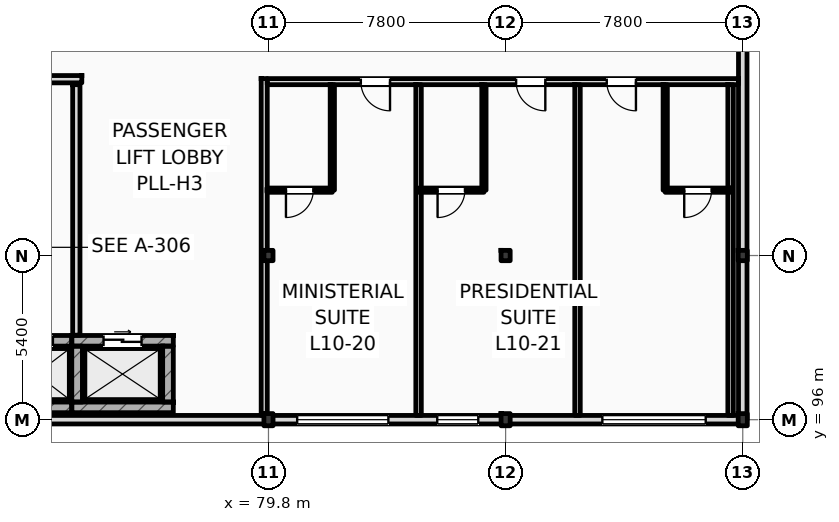
"""IFC4 building model, lengths in metres.
Left out: names, types, materials, properties, quantities, classifications, styles, units other than length and angle.
Written with IfcOpenShell. Run it as: python <this file> out.ifc"""

import sys

from ifc_helpers import new_model, si_unit, direction, frame, frame_2d, origin, origin_2d, place, context, subcontext, project, spatial, rectangle, i_section, extrude, element, fill, save


model = new_model("IFC4")
c1 = context("Model", 3, precision=1e-05, world=origin(), true_north=direction((0.0, 1.0)))
c2 = subcontext(c1, "Body", "Model", "MODEL_VIEW")
j1 = project(units=[si_unit("LENGTHUNIT", "METRE"), si_unit("PLANEANGLEUNIT", "RADIAN")], contexts=[c1])
p1 = place(None, origin())
s1 = spatial("IfcSite", under=j1, at=p1, CompositionType="ELEMENT")
p2 = place(p1, origin())
s2 = spatial("IfcBuilding", under=s1, at=p2, CompositionType="ELEMENT")
p3 = place(p2, frame((0.0, 0.0, 42.6)))
s3 = spatial("IfcBuildingStorey", under=s2, at=p3, CompositionType="ELEMENT", Elevation=42.6)
p4 = place(p3, frame((79.8, 96.0, 0.0), z_axis=(0.0, 0.0, 1.0), x_axis=(1.0, 0.0, 0.0)))
e1 = element("IfcColumn", 1, at=p4, inside=s3, PredefinedType="COLUMN", context=c2, shape_type="SweptSolid", body=[
    extrude(i_section(OverallWidth=0.3, OverallDepth=0.4, WebThickness=0.013, FlangeThickness=0.024, FilletRadius=0.027, at=origin_2d()), origin(), (0.0, 0.0, 1.0), 4.2),
])
p5 = place(p3, frame((79.8, 101.4, 0.0), z_axis=(0.0, 0.0, 1.0), x_axis=(1.0, 0.0, 0.0)))
e2 = element("IfcColumn", 2, at=p5, inside=s3, PredefinedType="COLUMN", context=c2, shape_type="SweptSolid", body=[
    extrude(i_section(OverallWidth=0.3, OverallDepth=0.34, WebThickness=0.012, FlangeThickness=0.021, FilletRadius=0.027, at=origin_2d()), origin(), (0.0, 0.0, 1.0), 4.2),
])
p6 = place(p3, frame((87.6, 96.0, 0.0), z_axis=(0.0, 0.0, 1.0), x_axis=(1.0, 0.0, 0.0)))
e3 = element("IfcColumn", 3, at=p6, inside=s3, PredefinedType="COLUMN", context=c2, shape_type="SweptSolid", body=[
    extrude(i_section(OverallWidth=0.3, OverallDepth=0.4, WebThickness=0.013, FlangeThickness=0.024, FilletRadius=0.027, at=origin_2d()), origin(), (0.0, 0.0, 1.0), 4.2),
])
p7 = place(p3, frame((87.6, 101.4, 0.0), z_axis=(0.0, 0.0, 1.0), x_axis=(1.0, 0.0, 0.0)))
e4 = element("IfcColumn", 4, at=p7, inside=s3, PredefinedType="COLUMN", context=c2, shape_type="SweptSolid", body=[
    extrude(i_section(OverallWidth=0.3, OverallDepth=0.34, WebThickness=0.012, FlangeThickness=0.021, FilletRadius=0.027, at=origin_2d()), origin(), (0.0, 0.0, 1.0), 4.2),
])
p8 = place(p3, frame((95.4, 96.0, 0.0), z_axis=(0.0, 0.0, 1.0), x_axis=(1.0, 0.0, 0.0)))
e5 = element("IfcColumn", 5, at=p8, inside=s3, PredefinedType="COLUMN", context=c2, shape_type="SweptSolid", body=[
    extrude(i_section(OverallWidth=0.3, OverallDepth=0.4, WebThickness=0.013, FlangeThickness=0.024, FilletRadius=0.027, at=origin_2d()), origin(), (0.0, 0.0, 1.0), 4.2),
])
p9 = place(p3, frame((95.4, 101.4, 0.0), z_axis=(0.0, 0.0, 1.0), x_axis=(1.0, 0.0, 0.0)))
e6 = element("IfcColumn", 6, at=p9, inside=s3, PredefinedType="COLUMN", context=c2, shape_type="SweptSolid", body=[
    extrude(i_section(OverallWidth=0.3, OverallDepth=0.34, WebThickness=0.012, FlangeThickness=0.021, FilletRadius=0.027, at=origin_2d()), origin(), (0.0, 0.0, 1.0), 4.2),
])
p10 = place(p3, frame((95.4, 96.0, 0.0), z_axis=(0.0, 0.0, 1.0), x_axis=(0.0, 1.0, 0.0)))
e7 = element("IfcWall", 7, at=p10, inside=s3, PredefinedType="STANDARD", context=c2, shape_type="SweptSolid", body=[
    extrude(rectangle(XDim=22.0, YDim=0.28, at=frame_2d((11.0, 0.0))), origin(), (0.0, 0.0, 1.0), 3.51),
])
p11 = place(p3, frame((25.2, 96.0, 0.0), z_axis=(0.0, 0.0, 1.0), x_axis=(1.0, 0.0, 0.0)))
e8 = element("IfcWall", 8, at=p11, inside=s3, PredefinedType="STANDARD", context=c2, shape_type="SweptSolid", body=[
    extrude(rectangle(XDim=70.2, YDim=0.28, at=frame_2d((35.1, 0.0))), origin(), (0.0, 0.0, 1.0), 3.42),
])
p12 = place(p11, frame((16.83, 0.0, 0.9)))
e9 = element("IfcOpeningElement", 9, at=p12, cuts=e8, PredefinedType="OPENING", context=c2, shape_type="SweptSolid", body=[
    extrude(rectangle(XDim=2.25, YDim=2.15, at=frame_2d((1.125, 1.075))), frame((0.0, 0.15, 0.0), z_axis=(0.0, -1.0, 0.0), x_axis=(1.0, 0.0, 0.0)), (0.0, 0.0, 1.0), 0.3),
])
p13 = place(p11, frame((20.815, 0.0, 0.9)))
e10 = element("IfcOpeningElement", 10, at=p13, cuts=e8, PredefinedType="OPENING", context=c2, shape_type="SweptSolid", body=[
    extrude(rectangle(XDim=1.8, YDim=2.2, at=frame_2d((0.9, 1.1))), frame((0.0, 0.15, 0.0), z_axis=(0.0, -1.0, 0.0), x_axis=(1.0, 0.0, 0.0)), (0.0, 0.0, 1.0), 0.3),
])
p14 = place(p11, frame((26.03, 0.0, 0.9)))
e11 = element("IfcOpeningElement", 11, at=p14, cuts=e8, PredefinedType="OPENING", context=c2, shape_type="SweptSolid", body=[
    extrude(rectangle(XDim=2.55, YDim=2.25, at=frame_2d((1.275, 1.125))), frame((0.0, 0.15, 0.0), z_axis=(0.0, -1.0, 0.0), x_axis=(1.0, 0.0, 0.0)), (0.0, 0.0, 1.0), 0.3),
])
p15 = place(p11, frame((32.045, 0.0, 0.9)))
e12 = element("IfcOpeningElement", 12, at=p15, cuts=e8, PredefinedType="OPENING", context=c2, shape_type="SweptSolid", body=[
    extrude(rectangle(XDim=1.35, YDim=2.3, at=frame_2d((0.675, 1.15))), frame((0.0, 0.15, 0.0), z_axis=(0.0, -1.0, 0.0), x_axis=(1.0, 0.0, 0.0)), (0.0, 0.0, 1.0), 0.3),
])
p16 = place(p11, frame((35.2, 0.0, 0.9)))
e13 = element("IfcOpeningElement", 13, at=p16, cuts=e8, PredefinedType="OPENING", context=c2, shape_type="SweptSolid", body=[
    extrude(rectangle(XDim=2.85, YDim=2.34, at=frame_2d((1.425, 1.17))), frame((0.0, 0.15, 0.0), z_axis=(0.0, -1.0, 0.0), x_axis=(1.0, 0.0, 0.0)), (0.0, 0.0, 1.0), 0.3),
])
p17 = place(p11, frame((55.544, 0.0, 0.9)))
e14 = element("IfcOpeningElement", 14, at=p17, cuts=e8, PredefinedType="OPENING", context=c2, shape_type="SweptSolid", body=[
    extrude(rectangle(XDim=3.0, YDim=2.34, at=frame_2d((1.5, 1.17))), frame((0.0, 0.15, 0.0), z_axis=(0.0, -1.0, 0.0), x_axis=(1.0, 0.0, 0.0)), (0.0, 0.0, 1.0), 0.3),
])
p18 = place(p11, frame((60.151, 0.0, 0.9)))
e15 = element("IfcOpeningElement", 15, at=p18, cuts=e8, PredefinedType="OPENING", context=c2, shape_type="SweptSolid", body=[
    extrude(rectangle(XDim=1.35, YDim=2.34, at=frame_2d((0.675, 1.17))), frame((0.0, 0.15, 0.0), z_axis=(0.0, -1.0, 0.0), x_axis=(1.0, 0.0, 0.0)), (0.0, 0.0, 1.0), 0.3),
])
p19 = place(p11, frame((65.582, 0.0, 0.9)))
e16 = element("IfcOpeningElement", 16, at=p19, cuts=e8, PredefinedType="OPENING", context=c2, shape_type="SweptSolid", body=[
    extrude(rectangle(XDim=3.4, YDim=2.34, at=frame_2d((1.7, 1.17))), frame((0.0, 0.15, 0.0), z_axis=(0.0, -1.0, 0.0), x_axis=(1.0, 0.0, 0.0)), (0.0, 0.0, 1.0), 0.3),
])
p20 = place(p3, frame((70.64, 98.595, 0.0), z_axis=(0.0, 0.0, 1.0), x_axis=(1.0, 0.0, 0.0)))
e17 = element("IfcWall", 17, at=p20, inside=s3, PredefinedType="SHEAR", context=c2, shape_type="SweptSolid", body=[
    extrude(rectangle(XDim=2.69, YDim=0.35, at=frame_2d((1.345, 0.0))), origin(), (0.0, 0.0, 1.0), 3.94),
])
p21 = place(p20, frame((0.97, 0.0, 0.0)))
e18 = element("IfcOpeningElement", 18, at=p21, cuts=e17, PredefinedType="OPENING", context=c2, shape_type="SweptSolid", body=[
    extrude(rectangle(XDim=1.1, YDim=2.2, at=frame_2d((0.55, 1.1))), frame((0.0, 0.185, 0.0), z_axis=(0.0, -1.0, 0.0), x_axis=(1.0, 0.0, 0.0)), (0.0, 0.0, 1.0), 0.37),
])
p22 = place(p3, frame((70.64, 96.405, 0.0), z_axis=(0.0, 0.0, 1.0), x_axis=(1.0, 0.0, 0.0)))
e19 = element("IfcWall", 19, at=p22, inside=s3, PredefinedType="SHEAR", context=c2, shape_type="SweptSolid", body=[
    extrude(rectangle(XDim=2.69, YDim=0.35, at=frame_2d((1.345, 0.0))), origin(), (0.0, 0.0, 1.0), 3.94),
])
p23 = place(p3, frame((73.33, 98.595, 0.0), z_axis=(0.0, 0.0, 1.0), x_axis=(1.0, 0.0, 0.0)))
e20 = element("IfcWall", 20, at=p23, inside=s3, PredefinedType="SHEAR", context=c2, shape_type="SweptSolid", body=[
    extrude(rectangle(XDim=3.34, YDim=0.35, at=frame_2d((1.67, 0.0))), origin(), (0.0, 0.0, 1.0), 3.94),
])
p24 = place(p23, frame((1.045, 0.0, 0.0)))
e21 = element("IfcOpeningElement", 21, at=p24, cuts=e20, PredefinedType="OPENING", context=c2, shape_type="SweptSolid", body=[
    extrude(rectangle(XDim=1.25, YDim=2.25, at=frame_2d((0.625, 1.125))), frame((0.0, 0.185, 0.0), z_axis=(0.0, -1.0, 0.0), x_axis=(1.0, 0.0, 0.0)), (0.0, 0.0, 1.0), 0.37),
])
p25 = place(p3, frame((73.33, 96.405, 0.0), z_axis=(0.0, 0.0, 1.0), x_axis=(1.0, 0.0, 0.0)))
e22 = element("IfcWall", 22, at=p25, inside=s3, PredefinedType="SHEAR", context=c2, shape_type="SweptSolid", body=[
    extrude(rectangle(XDim=3.34, YDim=0.35, at=frame_2d((1.67, 0.0))), origin(), (0.0, 0.0, 1.0), 3.94),
])
for number, where, z_axis, x_axis in (
    (23, (73.505, 96.58, 0.0), (0.0, 0.0, 1.0), (0.0, 1.0, 0.0)),
    (24, (76.495, 96.58, 0.0), (0.0, 0.0, 1.0), (0.0, 1.0, 0.0)),
):
    element("IfcWall", number, at=place(p3, frame(where, z_axis=z_axis, x_axis=x_axis)), inside=s3, PredefinedType="SHEAR", context=c2, shape_type="SweptSolid", body=[
        extrude(rectangle(XDim=1.84, YDim=0.35, at=frame_2d((0.92, 0.0))), origin(), (0.0, 0.0, 1.0), 3.94),
    ])
p26 = place(p3, frame((73.48, 98.78, 0.0), z_axis=(0.0, 0.0, 1.0), x_axis=(0.0, 1.0, 0.0)))
e25 = element("IfcWall", 25, at=p26, inside=s3, PredefinedType="STANDARD", context=c2, shape_type="SweptSolid", body=[
    extrude(rectangle(XDim=8.24, YDim=0.24, at=frame_2d((4.12, 0.0))), origin(), (0.0, 0.0, 1.0), 3.94),
])
p27 = place(p3, frame((69.56, 107.2, 0.0), z_axis=(0.0, 0.0, 1.0), x_axis=(1.0, 0.0, 0.0)))
e26 = element("IfcWall", 26, at=p27, inside=s3, PredefinedType="STANDARD", context=c2, shape_type="SweptSolid", body=[
    extrude(rectangle(XDim=4.1, YDim=0.24, at=frame_2d((2.05, 0.0))), origin(), (0.0, 0.0, 1.0), 3.94),
])
p28 = place(p27, frame((1.3, 0.0, 0.0)))
e27 = element("IfcOpeningElement", 27, at=p28, cuts=e26, PredefinedType="OPENING", context=c2, shape_type="SweptSolid", body=[
    extrude(rectangle(XDim=1.1, YDim=2.2, at=frame_2d((0.55, 1.1))), frame((0.0, 0.13, 0.0), z_axis=(0.0, -1.0, 0.0), x_axis=(1.0, 0.0, 0.0)), (0.0, 0.0, 1.0), 0.26),
])
p29 = place(p3, frame((79.76, 107.12, 0.0), z_axis=(0.0, 0.0, 1.0), x_axis=(1.0, 0.0, 0.0)))
e28 = element("IfcWall", 28, at=p29, inside=s3, PredefinedType="PARTITIONING", context=c2, shape_type="SweptSolid", body=[
    extrude(rectangle(XDim=15.5, YDim=0.2, at=frame_2d((7.75, 0.0))), origin(), (0.0, 0.0, 1.0), 3.94),
])
p30 = place(p29, frame((3.078, 0.0, 0.0)))
e29 = element("IfcOpeningElement", 29, at=p30, cuts=e28, PredefinedType="OPENING", context=c2, shape_type="SweptSolid", body=[
    extrude(rectangle(XDim=0.96, YDim=2.2, at=frame_2d((0.48, 1.1))), frame((0.0, 0.11, 0.0), z_axis=(0.0, -1.0, 0.0), x_axis=(1.0, 0.0, 0.0)), (0.0, 0.0, 1.0), 0.22),
])
p31 = place(p29, frame((8.186, 0.0, 0.0)))
e30 = element("IfcOpeningElement", 30, at=p31, cuts=e28, PredefinedType="OPENING", context=c2, shape_type="SweptSolid", body=[
    extrude(rectangle(XDim=0.96, YDim=2.2, at=frame_2d((0.48, 1.1))), frame((0.0, 0.11, 0.0), z_axis=(0.0, -1.0, 0.0), x_axis=(1.0, 0.0, 0.0)), (0.0, 0.0, 1.0), 0.22),
])
p32 = place(p29, frame((11.167, 0.0, 0.0)))
e31 = element("IfcOpeningElement", 31, at=p32, cuts=e28, PredefinedType="OPENING", context=c2, shape_type="SweptSolid", body=[
    extrude(rectangle(XDim=0.96, YDim=2.2, at=frame_2d((0.48, 1.1))), frame((0.0, 0.11, 0.0), z_axis=(0.0, -1.0, 0.0), x_axis=(1.0, 0.0, 0.0)), (0.0, 0.0, 1.0), 0.22),
])
p33 = place(p3, frame((79.66, 96.14, 0.0), z_axis=(0.0, 0.0, 1.0), x_axis=(0.0, 1.0, 0.0)))
e32 = element("IfcWall", 32, at=p33, inside=s3, PredefinedType="PARTITIONING", context=c2, shape_type="SweptSolid", body=[
    extrude(rectangle(XDim=11.08, YDim=0.2, at=frame_2d((5.54, 0.0))), origin(), (0.0, 0.0, 1.0), 3.51),
])
p34 = place(p3, frame((84.737, 96.14, 0.0), z_axis=(0.0, 0.0, 1.0), x_axis=(0.0, 1.0, 0.0)))
e33 = element("IfcWall", 33, at=p34, inside=s3, PredefinedType="PARTITIONING", context=c2, shape_type="SweptSolid", body=[
    extrude(rectangle(XDim=10.88, YDim=0.18, at=frame_2d((5.44, 0.0))), origin(), (0.0, 0.0, 1.0), 3.94),
])
p35 = place(p3, frame((81.9, 103.55, 0.0), z_axis=(0.0, 0.0, 1.0), x_axis=(0.0, 1.0, 0.0)))
e34 = element("IfcWall", 34, at=p35, inside=s3, PredefinedType="PARTITIONING", context=c2, shape_type="SweptSolid", body=[
    extrude(rectangle(XDim=3.47, YDim=0.14, at=frame_2d((1.735, 0.0))), origin(), (0.0, 0.0, 1.0), 3.94),
])
p36 = place(p3, frame((79.75, 103.55, 0.0), z_axis=(0.0, 0.0, 1.0), x_axis=(1.0, 0.0, 0.0)))
e35 = element("IfcWall", 35, at=p36, inside=s3, PredefinedType="PARTITIONING", context=c2, shape_type="SweptSolid", body=[
    extrude(rectangle(XDim=2.15, YDim=0.14, at=frame_2d((1.075, 0.0))), origin(), (0.0, 0.0, 1.0), 3.94),
])
p37 = place(p36, frame((0.625, 0.0, 0.0)))
e36 = element("IfcOpeningElement", 36, at=p37, cuts=e35, PredefinedType="OPENING", context=c2, shape_type="SweptSolid", body=[
    extrude(rectangle(XDim=0.9, YDim=2.1, at=frame_2d((0.45, 1.05))), frame((0.0, 0.08, 0.0), z_axis=(0.0, -1.0, 0.0), x_axis=(1.0, 0.0, 0.0)), (0.0, 0.0, 1.0), 0.16),
])
p38 = place(p3, frame((89.965, 96.14, 0.0), z_axis=(0.0, 0.0, 1.0), x_axis=(0.0, 1.0, 0.0)))
e37 = element("IfcWall", 37, at=p38, inside=s3, PredefinedType="PARTITIONING", context=c2, shape_type="SweptSolid", body=[
    extrude(rectangle(XDim=10.88, YDim=0.18, at=frame_2d((5.44, 0.0))), origin(), (0.0, 0.0, 1.0), 3.57),
])
p39 = place(p3, frame((86.887, 103.55, 0.0), z_axis=(0.0, 0.0, 1.0), x_axis=(0.0, 1.0, 0.0)))
e38 = element("IfcWall", 38, at=p39, inside=s3, PredefinedType="PARTITIONING", context=c2, shape_type="SweptSolid", body=[
    extrude(rectangle(XDim=3.47, YDim=0.14, at=frame_2d((1.735, 0.0))), origin(), (0.0, 0.0, 1.0), 3.94),
])
p40 = place(p3, frame((84.737, 103.55, 0.0), z_axis=(0.0, 0.0, 1.0), x_axis=(1.0, 0.0, 0.0)))
e39 = element("IfcWall", 39, at=p40, inside=s3, PredefinedType="PARTITIONING", context=c2, shape_type="SweptSolid", body=[
    extrude(rectangle(XDim=2.15, YDim=0.14, at=frame_2d((1.075, 0.0))), origin(), (0.0, 0.0, 1.0), 3.94),
])
p41 = place(p40, frame((0.625, 0.0, 0.0)))
e40 = element("IfcOpeningElement", 40, at=p41, cuts=e39, PredefinedType="OPENING", context=c2, shape_type="SweptSolid", body=[
    extrude(rectangle(XDim=0.9, YDim=2.1, at=frame_2d((0.45, 1.05))), frame((0.0, 0.08, 0.0), z_axis=(0.0, -1.0, 0.0), x_axis=(1.0, 0.0, 0.0)), (0.0, 0.0, 1.0), 0.16),
])
p42 = place(p3, frame((95.0, 96.14, 0.0), z_axis=(0.0, 0.0, 1.0), x_axis=(0.0, 1.0, 0.0)))
e41 = element("IfcWall", 41, at=p42, inside=s3, PredefinedType="PARTITIONING", context=c2, shape_type="SweptSolid", body=[
    extrude(rectangle(XDim=10.88, YDim=0.18, at=frame_2d((5.44, 0.0))), origin(), (0.0, 0.0, 1.0), 3.94),
])
p43 = place(p3, frame((92.85, 103.55, 0.0), z_axis=(0.0, 0.0, 1.0), x_axis=(0.0, 1.0, 0.0)))
e42 = element("IfcWall", 42, at=p43, inside=s3, PredefinedType="PARTITIONING", context=c2, shape_type="SweptSolid", body=[
    extrude(rectangle(XDim=3.47, YDim=0.14, at=frame_2d((1.735, 0.0))), origin(), (0.0, 0.0, 1.0), 3.57),
])
p44 = place(p3, frame((92.85, 103.55, 0.0), z_axis=(0.0, 0.0, 1.0), x_axis=(1.0, 0.0, 0.0)))
e43 = element("IfcWall", 43, at=p44, inside=s3, PredefinedType="PARTITIONING", context=c2, shape_type="SweptSolid", body=[
    extrude(rectangle(XDim=2.15, YDim=0.14, at=frame_2d((1.075, 0.0))), origin(), (0.0, 0.0, 1.0), 3.94),
])
p45 = place(p44, frame((0.625, 0.0, 0.0)))
e44 = element("IfcOpeningElement", 44, at=p45, cuts=e43, PredefinedType="OPENING", context=c2, shape_type="SweptSolid", body=[
    extrude(rectangle(XDim=0.9, YDim=2.1, at=frame_2d((0.45, 1.05))), frame((0.0, 0.08, 0.0), z_axis=(0.0, -1.0, 0.0), x_axis=(1.0, 0.0, 0.0)), (0.0, 0.0, 1.0), 0.16),
])
p46 = place(p17, origin())
e45 = element("IfcWindow", 45, at=p46, inside=s3, PartitioningType="DOUBLE_PANEL_VERTICAL", PredefinedType="WINDOW", context=c2, shape_type="SweptSolid", body=[
    extrude(rectangle(XDim=3.0, YDim=2.34, at=frame_2d((1.5, 1.17))), frame((0.0, 0.03, 0.0), z_axis=(0.0, -1.0, 0.0), x_axis=(1.0, 0.0, 0.0)), (0.0, 0.0, 1.0), 0.06),
])
fill(e14, e45)
p47 = place(p18, origin())
e46 = element("IfcWindow", 46, at=p47, inside=s3, PartitioningType="DOUBLE_PANEL_VERTICAL", PredefinedType="WINDOW", context=c2, shape_type="SweptSolid", body=[
    extrude(rectangle(XDim=1.35, YDim=2.34, at=frame_2d((0.675, 1.17))), frame((0.0, 0.03, 0.0), z_axis=(0.0, -1.0, 0.0), x_axis=(1.0, 0.0, 0.0)), (0.0, 0.0, 1.0), 0.06),
])
fill(e15, e46)
p48 = place(p19, origin())
e47 = element("IfcWindow", 47, at=p48, inside=s3, PartitioningType="DOUBLE_PANEL_VERTICAL", PredefinedType="WINDOW", context=c2, shape_type="SweptSolid", body=[
    extrude(rectangle(XDim=3.4, YDim=2.34, at=frame_2d((1.7, 1.17))), frame((0.0, 0.03, 0.0), z_axis=(0.0, -1.0, 0.0), x_axis=(1.0, 0.0, 0.0)), (0.0, 0.0, 1.0), 0.06),
])
fill(e16, e47)
p49 = place(p21, origin())
e48 = element("IfcDoor", 48, at=p49, inside=s3, OperationType="SLIDING_TO_LEFT", PredefinedType="DOOR", context=c2, shape_type="SweptSolid", body=[
    extrude(rectangle(XDim=1.1, YDim=2.2, at=frame_2d((0.55, 1.1))), frame((0.0, 0.025, 0.0), z_axis=(0.0, -1.0, 0.0), x_axis=(1.0, 0.0, 0.0)), (0.0, 0.0, 1.0), 0.05),
])
fill(e18, e48)
p50 = place(p24, origin())
e49 = element("IfcDoor", 49, at=p50, inside=s3, OperationType="SLIDING_TO_LEFT", PredefinedType="DOOR", context=c2, shape_type="SweptSolid", body=[
    extrude(rectangle(XDim=1.25, YDim=2.25, at=frame_2d((0.625, 1.125))), frame((0.0, 0.025, 0.0), z_axis=(0.0, -1.0, 0.0), x_axis=(1.0, 0.0, 0.0)), (0.0, 0.0, 1.0), 0.05),
])
fill(e21, e49)
p51 = place(p30, frame((0.96, 0.0, 0.0), z_axis=(0.0, 0.0, 1.0), x_axis=(-1.0, 0.0, 0.0)))
e50 = element("IfcDoor", 50, at=p51, inside=s3, OperationType="SINGLE_SWING_RIGHT", PredefinedType="DOOR", context=c2, shape_type="SweptSolid", body=[
    extrude(rectangle(XDim=0.96, YDim=2.2, at=frame_2d((0.48, 1.1))), frame((0.0, 0.025, 0.0), z_axis=(0.0, -1.0, 0.0), x_axis=(1.0, 0.0, 0.0)), (0.0, 0.0, 1.0), 0.05),
])
fill(e29, e50)
p52 = place(p37, frame((0.9, 0.0, 0.0), z_axis=(0.0, 0.0, 1.0), x_axis=(-1.0, 0.0, 0.0)))
e51 = element("IfcDoor", 51, at=p52, inside=s3, OperationType="SINGLE_SWING_LEFT", PredefinedType="DOOR", context=c2, shape_type="SweptSolid", body=[
    extrude(rectangle(XDim=0.9, YDim=2.1, at=frame_2d((0.45, 1.05))), frame((0.0, 0.025, 0.0), z_axis=(0.0, -1.0, 0.0), x_axis=(1.0, 0.0, 0.0)), (0.0, 0.0, 1.0), 0.05),
])
fill(e36, e51)
p53 = place(p31, frame((0.96, 0.0, 0.0), z_axis=(0.0, 0.0, 1.0), x_axis=(-1.0, 0.0, 0.0)))
e52 = element("IfcDoor", 52, at=p53, inside=s3, OperationType="SINGLE_SWING_RIGHT", PredefinedType="DOOR", context=c2, shape_type="SweptSolid", body=[
    extrude(rectangle(XDim=0.96, YDim=2.2, at=frame_2d((0.48, 1.1))), frame((0.0, 0.025, 0.0), z_axis=(0.0, -1.0, 0.0), x_axis=(1.0, 0.0, 0.0)), (0.0, 0.0, 1.0), 0.05),
])
fill(e30, e52)
p54 = place(p41, frame((0.9, 0.0, 0.0), z_axis=(0.0, 0.0, 1.0), x_axis=(-1.0, 0.0, 0.0)))
e53 = element("IfcDoor", 53, at=p54, inside=s3, OperationType="SINGLE_SWING_LEFT", PredefinedType="DOOR", context=c2, shape_type="SweptSolid", body=[
    extrude(rectangle(XDim=0.9, YDim=2.1, at=frame_2d((0.45, 1.05))), frame((0.0, 0.025, 0.0), z_axis=(0.0, -1.0, 0.0), x_axis=(1.0, 0.0, 0.0)), (0.0, 0.0, 1.0), 0.05),
])
fill(e40, e53)
p55 = place(p32, frame((0.96, 0.0, 0.0), z_axis=(0.0, 0.0, 1.0), x_axis=(-1.0, 0.0, 0.0)))
e54 = element("IfcDoor", 54, at=p55, inside=s3, OperationType="SINGLE_SWING_RIGHT", PredefinedType="DOOR", context=c2, shape_type="SweptSolid", body=[
    extrude(rectangle(XDim=0.96, YDim=2.2, at=frame_2d((0.48, 1.1))), frame((0.0, 0.025, 0.0), z_axis=(0.0, -1.0, 0.0), x_axis=(1.0, 0.0, 0.0)), (0.0, 0.0, 1.0), 0.05),
])
fill(e31, e54)
p56 = place(p45, frame((0.9, 0.0, 0.0), z_axis=(0.0, 0.0, 1.0), x_axis=(-1.0, 0.0, 0.0)))
e55 = element("IfcDoor", 55, at=p56, inside=s3, OperationType="SINGLE_SWING_LEFT", PredefinedType="DOOR", context=c2, shape_type="SweptSolid", body=[
    extrude(rectangle(XDim=0.9, YDim=2.1, at=frame_2d((0.45, 1.05))), frame((0.0, 0.025, 0.0), z_axis=(0.0, -1.0, 0.0), x_axis=(1.0, 0.0, 0.0)), (0.0, 0.0, 1.0), 0.05),
])
fill(e44, e55)
save(model, sys.argv[1])
